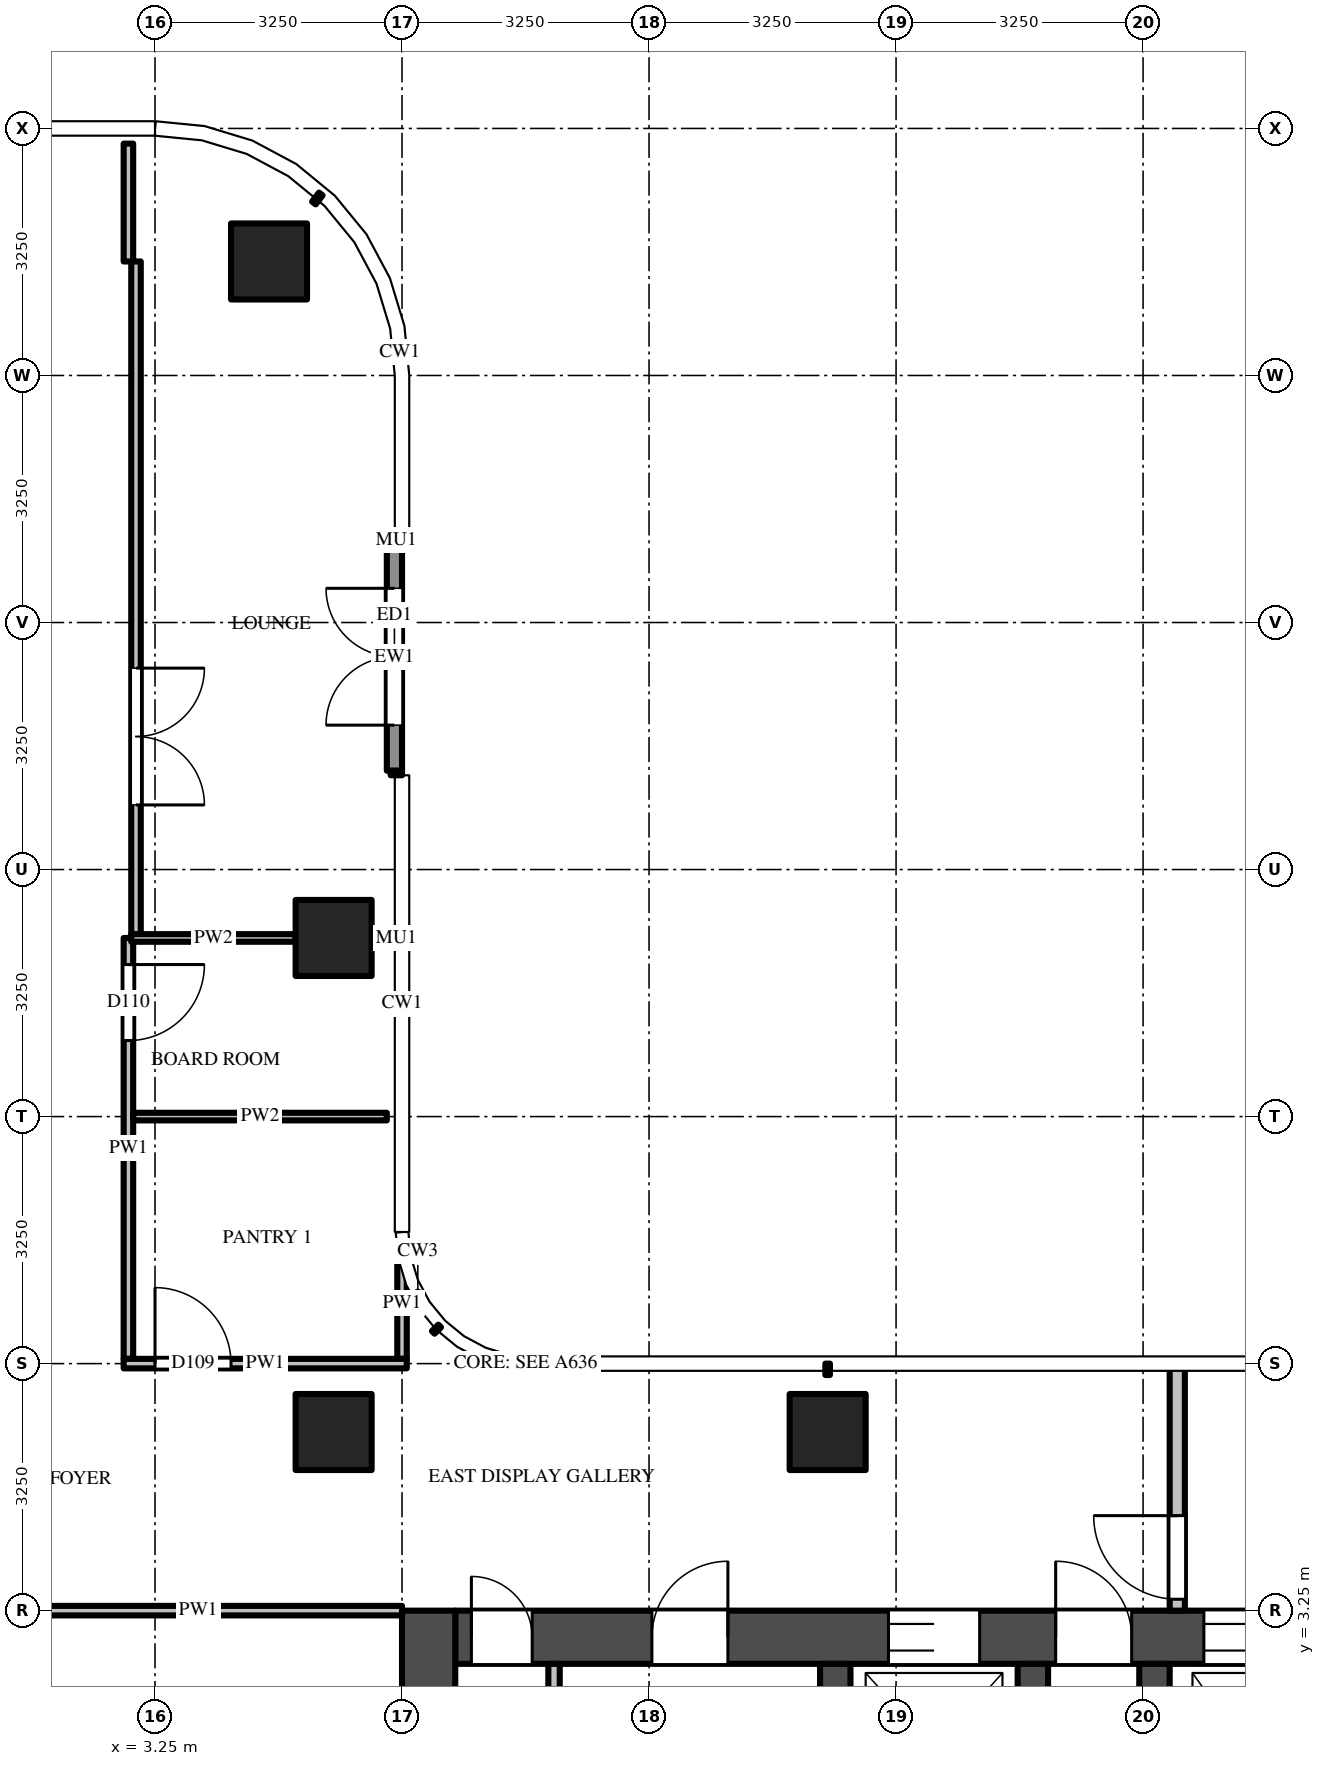
"""IFC4 building model, lengths in metres.
Left out: names, types, materials, properties, quantities, classifications, styles, units other than length and angle.
Written with IfcOpenShell. Run it as: python <this file> out.ifc"""

import sys

from ifc_helpers import new_model, si_unit, direction, frame, frame_2d, origin, origin_2d, place, context, subcontext, project, spatial, rectangle, extrude, source, transform, mapped, element, fill, save


model = new_model("IFC4")
c1 = context("Model", 3, precision=1e-05, world=origin(), true_north=direction((0.0, 1.0)))
c2 = subcontext(c1, "Body", "Model", "MODEL_VIEW")
j1 = project(units=[si_unit("LENGTHUNIT", "METRE"), si_unit("PLANEANGLEUNIT", "RADIAN")], contexts=[c1])
p1 = place(None, origin())
s1 = spatial("IfcSite", under=j1, at=p1, CompositionType="ELEMENT")
p2 = place(p1, origin())
s2 = spatial("IfcBuilding", under=s1, at=p2, CompositionType="ELEMENT")
p3 = place(p2, frame((0.0, 0.0, 287.2)))
s3 = spatial("IfcBuildingStorey", under=s2, at=p3, CompositionType="ELEMENT", Elevation=287.2)
m1 = source(origin(), c2, "Body", "SweptSolid", [
    extrude(rectangle(XDim=1.0, YDim=1.0, at=origin_2d()), origin(), (0.0, 0.0, 1.0), 3.9),
])
for number, where, z_axis, x_axis in (
    (1, (12.1, 5.6, 0.0), (0.0, 0.0, 1.0), (1.0, 0.0, 0.0)),
    (2, (5.6, 12.1, 0.0), (0.0, 0.0, 1.0), (1.0, 0.0, 0.0)),
    (3, (4.75, 21.0, 0.0), (0.0, 0.0, 1.0), (1.0, 0.0, 0.0)),
    (4, (5.6, 5.6, 0.0), (0.0, 0.0, 1.0), (1.0, 0.0, 0.0)),
):
    element("IfcColumn", number, at=place(p3, frame(where, z_axis=z_axis, x_axis=x_axis)), inside=s3, PredefinedType="COLUMN", context=c2, shape_type="MappedRepresentation", body=[
        mapped(m1, transform((0.0, 0.0, 0.0))),
    ])
m2 = source(origin(), c2, "Body", "SweptSolid", [
    extrude(rectangle(XDim=14.85, YDim=0.7, at=frame_2d((7.425, 0.0))), origin(), (0.0, 0.0, 1.0), 3.7),
])
p4 = place(p3, frame((7.2, 2.9, 0.0), z_axis=(0.0, 0.0, 1.0), x_axis=(1.0, 0.0, 0.0)))
e5 = element("IfcWall", 5, at=p4, inside=s3, PredefinedType="SHEAR", context=c2, shape_type="MappedRepresentation", body=[
    mapped(m2, transform((0.0, 0.0, 0.0))),
])
m3 = source(origin(), c2, "Body", "SweptSolid", [
    extrude(rectangle(XDim=1.2, YDim=2.1, at=frame_2d((0.6, 1.05))), frame((0.0, 0.36, 0.0), z_axis=(0.0, -1.0, 0.0), x_axis=(1.0, 0.0, 0.0)), (0.0, 0.0, 1.0), 0.72),
])
p5 = place(p4, frame((5.7, 0.0, 0.0)))
e6 = element("IfcOpeningElement", 6, at=p5, cuts=e5, PredefinedType="OPENING", context=c2, shape_type="MappedRepresentation", body=[
    mapped(m3, transform((0.0, 0.0, 0.0))),
])
m4 = source(origin(), c2, "Body", "SweptSolid", [
    extrude(rectangle(XDim=1.3, YDim=2.1, at=frame_2d((0.65, 1.05))), frame((0.0, 0.36, 0.0), z_axis=(0.0, -1.0, 0.0), x_axis=(1.0, 0.0, 0.0)), (0.0, 0.0, 1.0), 0.72),
])
p6 = place(p4, frame((12.2, 0.0, 0.0)))
e7 = element("IfcOpeningElement", 7, at=p6, cuts=e5, PredefinedType="OPENING", context=c2, shape_type="MappedRepresentation", body=[
    mapped(m4, transform((0.0, 0.0, 0.0))),
])
p7 = place(p4, frame((9.85, 0.0, 0.0)))
e8 = element("IfcOpeningElement", 8, at=p7, cuts=e5, PredefinedType="OPENING", context=c2, shape_type="MappedRepresentation", body=[
    mapped(m3, transform((0.0, 0.0, 0.0))),
])
m5 = source(origin(), c2, "Body", "SweptSolid", [
    extrude(rectangle(XDim=1.0, YDim=2.1, at=frame_2d((0.5, 1.05))), frame((0.0, 0.36, 0.0), z_axis=(0.0, -1.0, 0.0), x_axis=(1.0, 0.0, 0.0)), (0.0, 0.0, 1.0), 0.72),
])
p8 = place(p4, frame((7.9, 0.0, 0.0)))
e9 = element("IfcOpeningElement", 9, at=p8, cuts=e5, PredefinedType="OPENING", context=c2, shape_type="MappedRepresentation", body=[
    mapped(m5, transform((0.0, 0.0, 0.0))),
])
m6 = source(origin(), c2, "Body", "SweptSolid", [
    extrude(rectangle(XDim=0.8, YDim=2.1, at=frame_2d((0.4, 1.05))), frame((0.0, 0.36, 0.0), z_axis=(0.0, -1.0, 0.0), x_axis=(1.0, 0.0, 0.0)), (0.0, 0.0, 1.0), 0.72),
])
p9 = place(p4, frame((0.212, 0.0, 0.0)))
e10 = element("IfcOpeningElement", 10, at=p9, cuts=e5, PredefinedType="OPENING", context=c2, shape_type="MappedRepresentation", body=[
    mapped(m6, transform((0.0, 0.0, 0.0))),
])
p10 = place(p4, frame((2.587, 0.0, 0.0)))
e11 = element("IfcOpeningElement", 11, at=p10, cuts=e5, PredefinedType="OPENING", context=c2, shape_type="MappedRepresentation", body=[
    mapped(m5, transform((0.0, 0.0, 0.0))),
])
m7 = source(origin(), c2, "Body", "SweptSolid", [
    extrude(rectangle(XDim=9.05, YDim=0.7, at=frame_2d((4.525, 0.0))), origin(), (0.0, 0.0, 1.0), 3.7),
])
p11 = place(p3, frame((6.85, -5.8, 0.0), z_axis=(0.0, 0.0, 1.0), x_axis=(0.0, 1.0, 0.0)))
e12 = element("IfcWall", 12, at=p11, inside=s3, PredefinedType="SHEAR", context=c2, shape_type="MappedRepresentation", body=[
    mapped(m7, transform((0.0, 0.0, 0.0))),
])
m8 = source(origin(), c2, "Body", "SweptSolid", [
    extrude(rectangle(XDim=1.8, YDim=2.1, at=frame_2d((0.9, 1.05))), frame((0.0, 0.36, 0.0), z_axis=(0.0, -1.0, 0.0), x_axis=(1.0, 0.0, 0.0)), (0.0, 0.0, 1.0), 0.72),
])
p12 = place(p11, frame((3.15, 0.0, 0.0)))
e13 = element("IfcOpeningElement", 13, at=p12, cuts=e12, PredefinedType="OPENING", context=c2, shape_type="MappedRepresentation", body=[
    mapped(m8, transform((0.0, 0.0, 0.0))),
])
m9 = source(origin(), c2, "Body", "SweptSolid", [
    extrude(rectangle(XDim=2.45, YDim=0.4, at=frame_2d((1.225, 0.0))), origin(), (0.0, 0.0, 1.0), 3.7),
])
for number, where, z_axis, x_axis in (
    (14, (12.2, 0.1, 0.0), (0.0, 0.0, 1.0), (0.0, 1.0, 0.0)),
    (15, (14.8, 0.1, 0.0), (0.0, 0.0, 1.0), (0.0, 1.0, 0.0)),
    (16, (16.4, 0.1, 0.0), (0.0, 0.0, 1.0), (0.0, 1.0, 0.0)),
):
    element("IfcWall", number, at=place(p3, frame(where, z_axis=z_axis, x_axis=x_axis)), inside=s3, PredefinedType="SHEAR", context=c2, shape_type="MappedRepresentation", body=[
        mapped(m9, transform((0.0, 0.0, 0.0))),
    ])
m10 = source(origin(), c2, "Body", "SweptSolid", [
    extrude(rectangle(XDim=3.25, YDim=0.2, at=frame_2d((1.625, 0.0))), origin(), (0.0, 0.0, 1.0), 3.7),
])
p13 = place(p3, frame((16.7, 3.25, 0.0), z_axis=(0.0, 0.0, 1.0), x_axis=(0.0, 1.0, 0.0)))
e17 = element("IfcWall", 17, at=p13, inside=s3, PredefinedType="PARTITIONING", context=c2, shape_type="MappedRepresentation", body=[
    mapped(m10, transform((0.0, 0.0, 0.0))),
])
m11 = source(origin(), c2, "Body", "SweptSolid", [
    extrude(rectangle(XDim=1.1, YDim=2.1, at=frame_2d((0.55, 1.05))), frame((0.0, 0.11, 0.0), z_axis=(0.0, -1.0, 0.0), x_axis=(1.0, 0.0, 0.0)), (0.0, 0.0, 1.0), 0.22),
])
p14 = place(p13, frame((0.15, 0.0, 0.0)))
e18 = element("IfcOpeningElement", 18, at=p14, cuts=e17, PredefinedType="OPENING", context=c2, shape_type="MappedRepresentation", body=[
    mapped(m11, transform((0.0, 0.0, 0.0))),
])
m12 = source(origin(), c2, "Body", "SweptSolid", [
    extrude(rectangle(XDim=2.45, YDim=0.15, at=frame_2d((1.225, 0.0))), origin(), (0.0, 0.0, 1.0), 3.7),
])
p15 = place(p3, frame((8.5, 0.1, 0.0), z_axis=(0.0, 0.0, 1.0), x_axis=(0.0, 1.0, 0.0)))
e19 = element("IfcWall", 19, at=p15, inside=s3, PredefinedType="PARTITIONING", context=c2, shape_type="MappedRepresentation", body=[
    mapped(m12, transform((0.0, 0.0, 0.0))),
])
m13 = source(origin(), c2, "Body", "SweptSolid", [
    extrude(rectangle(XDim=3.0, YDim=0.2, at=frame_2d((1.5, 0.0))), origin(), (0.0, 0.0, 1.0), 3.7),
])
p16 = place(p3, frame((6.4, 14.3, 0.0), z_axis=(0.0, 0.0, 1.0), x_axis=(0.0, 1.0, 0.0)))
e20 = element("IfcWall", 20, at=p16, inside=s3, PredefinedType="SOLIDWALL", context=c2, shape_type="MappedRepresentation", body=[
    mapped(m13, transform((0.0, 0.0, 0.0))),
])
m14 = source(origin(), c2, "Body", "SweptSolid", [
    extrude(rectangle(XDim=1.8, YDim=2.4, at=frame_2d((0.9, 1.2))), frame((0.0, 0.11, 0.0), z_axis=(0.0, -1.0, 0.0), x_axis=(1.0, 0.0, 0.0)), (0.0, 0.0, 1.0), 0.22),
])
p17 = place(p16, frame((0.6, 0.0, 0.0)))
e21 = element("IfcOpeningElement", 21, at=p17, cuts=e20, PredefinedType="OPENING", context=c2, shape_type="MappedRepresentation", body=[
    mapped(m14, transform((0.0, 0.0, 0.0))),
])
m15 = source(origin(), c2, "Body", "SweptSolid", [
    extrude(rectangle(XDim=5.538, YDim=0.125, at=frame_2d((2.769, 0.0))), origin(), (0.0, 0.0, 1.0), 2.997),
])
p18 = place(p3, frame((2.9, 12.1, 0.0), z_axis=(0.0, 0.0, 1.0), x_axis=(0.0, -1.0, 0.0)))
e22 = element("IfcWall", 22, at=p18, inside=s3, PredefinedType="PARTITIONING", context=c2, shape_type="MappedRepresentation", body=[
    mapped(m15, transform((0.0, 0.0, 0.0))),
])
m16 = source(origin(), c2, "Body", "SweptSolid", [
    extrude(rectangle(XDim=1.0, YDim=2.1, at=frame_2d((0.5, 1.05))), frame((0.0, 0.073, 0.0), z_axis=(0.0, -1.0, 0.0), x_axis=(1.0, 0.0, 0.0)), (0.0, 0.0, 1.0), 0.145),
])
p19 = place(p18, frame((0.35, 0.0, 0.0)))
e23 = element("IfcOpeningElement", 23, at=p19, cuts=e22, PredefinedType="OPENING", context=c2, shape_type="MappedRepresentation", body=[
    mapped(m16, transform((0.0, 0.0, 0.0))),
])
m17 = source(origin(), c2, "Body", "SweptSolid", [
    extrude(rectangle(XDim=1.55, YDim=0.125, at=frame_2d((0.775, 0.0))), origin(), (0.0, 0.0, 1.0), 2.78),
])
p20 = place(p3, frame((2.9, 22.55, 0.0), z_axis=(0.0, 0.0, 1.0), x_axis=(0.0, -1.0, 0.0)))
e24 = element("IfcWall", 24, at=p20, inside=s3, PredefinedType="PARTITIONING", context=c2, shape_type="MappedRepresentation", body=[
    mapped(m17, transform((0.0, 0.0, 0.0))),
])
m18 = source(origin(), c2, "Body", "SweptSolid", [
    extrude(rectangle(XDim=8.85, YDim=0.125, at=frame_2d((4.425, 0.0))), origin(), (0.0, 0.0, 1.0), 2.78),
])
p21 = place(p3, frame((3.0, 21.0, 0.0), z_axis=(0.0, 0.0, 1.0), x_axis=(0.0, -1.0, 0.0)))
e25 = element("IfcWall", 25, at=p21, inside=s3, PredefinedType="PARTITIONING", context=c2, shape_type="MappedRepresentation", body=[
    mapped(m18, transform((0.0, 0.0, 0.0))),
])
m19 = source(origin(), c2, "Body", "SweptSolid", [
    extrude(rectangle(XDim=1.8, YDim=2.1, at=frame_2d((0.9, 1.05))), frame((0.0, 0.073, 0.0), z_axis=(0.0, -1.0, 0.0), x_axis=(1.0, 0.0, 0.0)), (0.0, 0.0, 1.0), 0.145),
])
p22 = place(p21, frame((5.35, 0.0, 0.0)))
e26 = element("IfcOpeningElement", 26, at=p22, cuts=e25, PredefinedType="OPENING", context=c2, shape_type="MappedRepresentation", body=[
    mapped(m19, transform((0.0, 0.0, 0.0))),
])
m20 = source(origin(), c2, "Body", "SweptSolid", [
    extrude(rectangle(XDim=1.469, YDim=0.125, at=frame_2d((0.734, 0.0))), origin(), (0.0, 0.0, 1.0), 3.7),
])
p23 = place(p3, frame((6.5, 6.562, 0.0), z_axis=(0.0, 0.0, 1.0), x_axis=(0.0, 1.0, 0.0)))
e27 = element("IfcWall", 27, at=p23, inside=s3, PredefinedType="PARTITIONING", context=c2, shape_type="MappedRepresentation", body=[
    mapped(m20, transform((0.0, 0.0, 0.0))),
])
m21 = source(origin(), c2, "Body", "SweptSolid", [
    extrude(rectangle(XDim=5.363, YDim=0.125, at=frame_2d((2.681, 0.0))), origin(), (0.0, 0.0, 1.0), 2.997),
])
p24 = place(p3, frame((1.137, 3.25, 0.0), z_axis=(0.0, 0.0, 1.0), x_axis=(1.0, 0.0, 0.0)))
e28 = element("IfcWall", 28, at=p24, inside=s3, PredefinedType="PARTITIONING", context=c2, shape_type="MappedRepresentation", body=[
    mapped(m21, transform((0.0, 0.0, 0.0))),
])
m22 = source(origin(), c2, "Body", "SweptSolid", [
    extrude(rectangle(XDim=3.725, YDim=0.125, at=frame_2d((1.863, 0.0))), origin(), (0.0, 0.0, 1.0), 2.78),
])
p25 = place(p3, frame((2.837, 6.5, 0.0), z_axis=(0.0, 0.0, 1.0), x_axis=(1.0, 0.0, 0.0)))
e29 = element("IfcWall", 29, at=p25, inside=s3, PredefinedType="PARTITIONING", context=c2, shape_type="MappedRepresentation", body=[
    mapped(m22, transform((0.0, 0.0, 0.0))),
])
p26 = place(p25, frame((0.413, 0.0, 0.0)))
e30 = element("IfcOpeningElement", 30, at=p26, cuts=e29, PredefinedType="OPENING", context=c2, shape_type="MappedRepresentation", body=[
    mapped(m16, transform((0.0, 0.0, 0.0))),
])
m23 = source(origin(), c2, "Body", "SweptSolid", [
    extrude(rectangle(XDim=3.338, YDim=0.1, at=frame_2d((1.669, 0.0))), origin(), (0.0, 0.0, 1.0), 2.78),
])
p27 = place(p3, frame((2.962, 9.75, 0.0), z_axis=(0.0, 0.0, 1.0), x_axis=(1.0, 0.0, 0.0)))
e31 = element("IfcWall", 31, at=p27, inside=s3, PredefinedType="PARTITIONING", context=c2, shape_type="MappedRepresentation", body=[
    mapped(m23, transform((0.0, 0.0, 0.0))),
])
m24 = source(origin(), c2, "Body", "SweptSolid", [
    extrude(rectangle(XDim=2.163, YDim=0.1, at=frame_2d((1.081, 0.0))), origin(), (0.0, 0.0, 1.0), 2.997),
])
p28 = place(p3, frame((2.938, 12.1, 0.0), z_axis=(0.0, 0.0, 1.0), x_axis=(1.0, 0.0, 0.0)))
e32 = element("IfcWall", 32, at=p28, inside=s3, PredefinedType="PARTITIONING", context=c2, shape_type="MappedRepresentation", body=[
    mapped(m24, transform((0.0, 0.0, 0.0))),
])
m25 = source(origin(), c2, "Body", "SweptSolid", [
    extrude(rectangle(XDim=1.2, YDim=2.1, at=frame_2d((0.6, 1.05))), frame((0.0, -0.275, 0.0), z_axis=(0.0, -1.0, 0.0), x_axis=(1.0, 0.0, 0.0)), (0.0, 0.0, 1.0), 0.05),
])
p29 = place(p5, origin())
e33 = element("IfcDoor", 33, at=p29, inside=s3, OperationType="DOUBLE_DOOR_SLIDING", PredefinedType="DOOR", context=c2, shape_type="MappedRepresentation", body=[
    mapped(m25, transform((0.0, 0.0, 0.0))),
])
fill(e6, e33)
p30 = place(p7, origin())
e34 = element("IfcDoor", 34, at=p30, inside=s3, OperationType="DOUBLE_DOOR_SLIDING", PredefinedType="DOOR", context=c2, shape_type="MappedRepresentation", body=[
    mapped(m25, transform((0.0, 0.0, 0.0))),
])
fill(e8, e34)
m26 = source(origin(), c2, "Body", "SweptSolid", [
    extrude(rectangle(XDim=1.0, YDim=2.1, at=frame_2d((0.5, 1.05))), frame((0.0, -0.275, 0.0), z_axis=(0.0, -1.0, 0.0), x_axis=(1.0, 0.0, 0.0)), (0.0, 0.0, 1.0), 0.05),
])
p31 = place(p8, origin())
e35 = element("IfcDoor", 35, at=p31, inside=s3, OperationType="SINGLE_SWING_LEFT", PredefinedType="DOOR", context=c2, shape_type="MappedRepresentation", body=[
    mapped(m26, transform((0.0, 0.0, 0.0))),
])
fill(e9, e35)
m27 = source(origin(), c2, "Body", "SweptSolid", [
    extrude(rectangle(XDim=1.1, YDim=2.1, at=frame_2d((0.55, 1.05))), frame((0.0, 0.025, 0.0), z_axis=(0.0, -1.0, 0.0), x_axis=(1.0, 0.0, 0.0)), (0.0, 0.0, 1.0), 0.05),
])
p32 = place(p14, origin())
e36 = element("IfcDoor", 36, at=p32, inside=s3, OperationType="SINGLE_SWING_RIGHT", PredefinedType="DOOR", context=c2, shape_type="MappedRepresentation", body=[
    mapped(m27, transform((0.0, 0.0, 0.0))),
])
fill(e18, e36)
m28 = source(origin(), c2, "Body", "SweptSolid", [
    extrude(rectangle(XDim=0.8, YDim=2.1, at=frame_2d((0.4, 1.05))), frame((0.0, -0.275, 0.0), z_axis=(0.0, -1.0, 0.0), x_axis=(1.0, 0.0, 0.0)), (0.0, 0.0, 1.0), 0.05),
])
p33 = place(p9, origin())
e37 = element("IfcDoor", 37, at=p33, inside=s3, OperationType="SINGLE_SWING_LEFT", PredefinedType="DOOR", context=c2, shape_type="MappedRepresentation", body=[
    mapped(m28, transform((0.0, 0.0, 0.0))),
])
fill(e10, e37)
p34 = place(p10, origin())
e38 = element("IfcDoor", 38, at=p34, inside=s3, OperationType="SINGLE_SWING_RIGHT", PredefinedType="DOOR", context=c2, shape_type="MappedRepresentation", body=[
    mapped(m26, transform((0.0, 0.0, 0.0))),
])
fill(e11, e38)
m29 = source(origin(), c2, "Body", "SweptSolid", [
    extrude(rectangle(XDim=1.8, YDim=2.4, at=frame_2d((0.9, 1.2))), frame((0.0, 0.025, 0.0), z_axis=(0.0, -1.0, 0.0), x_axis=(1.0, 0.0, 0.0)), (0.0, 0.0, 1.0), 0.05),
])
p35 = place(p17, origin())
e39 = element("IfcDoor", 39, at=p35, inside=s3, OperationType="DOUBLE_DOOR_SINGLE_SWING", PredefinedType="DOOR", context=c2, shape_type="MappedRepresentation", body=[
    mapped(m29, transform((0.0, 0.0, 0.0))),
])
fill(e21, e39)
m30 = source(origin(), c2, "Body", "SweptSolid", [
    extrude(rectangle(XDim=1.0, YDim=2.1, at=frame_2d((0.5, 1.05))), frame((0.0, 0.025, 0.0), z_axis=(0.0, -1.0, 0.0), x_axis=(1.0, 0.0, 0.0)), (0.0, 0.0, 1.0), 0.05),
])
p36 = place(p26, origin())
e40 = element("IfcDoor", 40, at=p36, inside=s3, OperationType="SINGLE_SWING_LEFT", PredefinedType="DOOR", context=c2, shape_type="MappedRepresentation", body=[
    mapped(m30, transform((0.0, 0.0, 0.0))),
])
fill(e30, e40)
p37 = place(p19, origin())
e41 = element("IfcDoor", 41, at=p37, inside=s3, OperationType="SINGLE_SWING_LEFT", PredefinedType="DOOR", context=c2, shape_type="MappedRepresentation", body=[
    mapped(m30, transform((0.0, 0.0, 0.0))),
])
fill(e23, e41)
m31 = source(origin(), c2, "Body", "SweptSolid", [
    extrude(rectangle(XDim=1.8, YDim=2.1, at=frame_2d((0.9, 1.05))), frame((0.0, 0.025, 0.0), z_axis=(0.0, -1.0, 0.0), x_axis=(1.0, 0.0, 0.0)), (0.0, 0.0, 1.0), 0.05),
])
p38 = place(p22, origin())
e42 = element("IfcDoor", 42, at=p38, inside=s3, OperationType="DOUBLE_DOOR_SINGLE_SWING", PredefinedType="DOOR", context=c2, shape_type="MappedRepresentation", body=[
    mapped(m31, transform((0.0, 0.0, 0.0))),
])
fill(e26, e42)
save(model, sys.argv[1])
